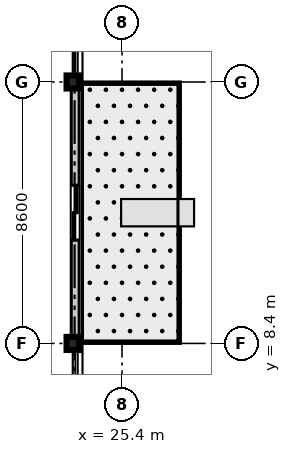
"""IFC4 building model, lengths in metres.
Left out: names, types, materials, properties, quantities, classifications, styles, units other than length and angle.
Written with IfcOpenShell. Run it as: python <this file> out.ifc"""

import sys

from ifc_helpers import new_model, si_unit, direction, frame, frame_2d, origin, origin_2d, place, context, subcontext, project, spatial, rectangle, i_section, extrude, source, transform, mapped, element, fill, save


model = new_model("IFC4")
c1 = context("Model", 3, precision=1e-05, world=origin(), true_north=direction((0.0, 1.0)))
c2 = subcontext(c1, "Body", "Model", "MODEL_VIEW")
j1 = project(units=[si_unit("LENGTHUNIT", "METRE"), si_unit("PLANEANGLEUNIT", "RADIAN")], contexts=[c1])
p1 = place(None, origin())
s1 = spatial("IfcSite", under=j1, at=p1, CompositionType="ELEMENT")
p2 = place(p1, origin())
s2 = spatial("IfcBuilding", under=s1, at=p2, CompositionType="ELEMENT")
p3 = place(p2, frame((0.0, 0.0, 132.1)))
s3 = spatial("IfcBuildingStorey", under=s2, at=p3, CompositionType="ELEMENT", Elevation=132.1)
m1 = source(origin(), c2, "Body", "SweptSolid", [
    extrude(i_section(OverallWidth=0.409, OverallDepth=0.43, WebThickness=0.021, FlangeThickness=0.034, at=origin_2d()), origin(), (0.0, 0.0, 1.0), 3.605),
])
for number, where, z_axis, x_axis in (
    (1, (23.78, 8.4, 0.0), (0.0, 0.0, 1.0), (1.0, 0.0, 0.0)),
    (2, (23.78, 17.0, 0.0), (0.0, 0.0, 1.0), (1.0, 0.0, 0.0)),
):
    element("IfcColumn", number, at=place(p3, frame(where, z_axis=z_axis, x_axis=x_axis)), inside=s3, PredefinedType="COLUMN", context=c2, shape_type="MappedRepresentation", body=[
        mapped(m1, transform((0.0, 0.0, 0.0), scale=1.0)),
    ])
m2 = source(origin(), c2, "Body", "SweptSolid", [
    extrude(rectangle(XDim=8.6, YDim=0.26, at=frame_2d((4.3, 0.0))), origin(), (0.0, 0.0, 1.0), 2.86),
])
p4 = place(p3, frame((23.86, 8.4, 0.0), z_axis=(0.0, 0.0, 1.0), x_axis=(0.0, 1.0, 0.0)))
e3 = element("IfcWall", 3, at=p4, inside=s3, PredefinedType="STANDARD", context=c2, shape_type="MappedRepresentation", body=[
    mapped(m2, transform((0.0, 0.0, 0.0), scale=1.0)),
])
p5 = place(p4, frame((3.4, 0.0, 0.0)))
e4 = element("IfcOpeningElement", 4, at=p5, cuts=e3, PredefinedType="OPENING", context=c2, shape_type="SweptSolid", body=[
    extrude(rectangle(XDim=1.8, YDim=2.25, at=frame_2d((0.9, 1.125))), frame((0.0, 0.14, 0.0), z_axis=(0.0, -1.0, 0.0), x_axis=(1.0, 0.0, 0.0)), (0.0, 0.0, 1.0), 0.28),
])
m3 = source(origin(), c2, "Body", "SweptSolid", [
    extrude(rectangle(XDim=1.8, YDim=2.25, at=frame_2d((0.9, 1.125))), frame((0.0, 0.025, 0.0), z_axis=(0.0, -1.0, 0.0), x_axis=(1.0, 0.0, 0.0)), (0.0, 0.0, 1.0), 0.05),
])
p6 = place(p5, frame((1.8, 0.0, 0.0), z_axis=(0.0, 0.0, 1.0), x_axis=(-1.0, 0.0, 0.0)))
e5 = element("IfcDoor", 5, at=p6, inside=s3, OperationType="DOUBLE_DOOR_SLIDING", PredefinedType="DOOR", context=c2, shape_type="MappedRepresentation", body=[
    mapped(m3, transform((0.0, 0.0, 0.0), scale=1.0)),
])
fill(e4, e5)
save(model, sys.argv[1])
